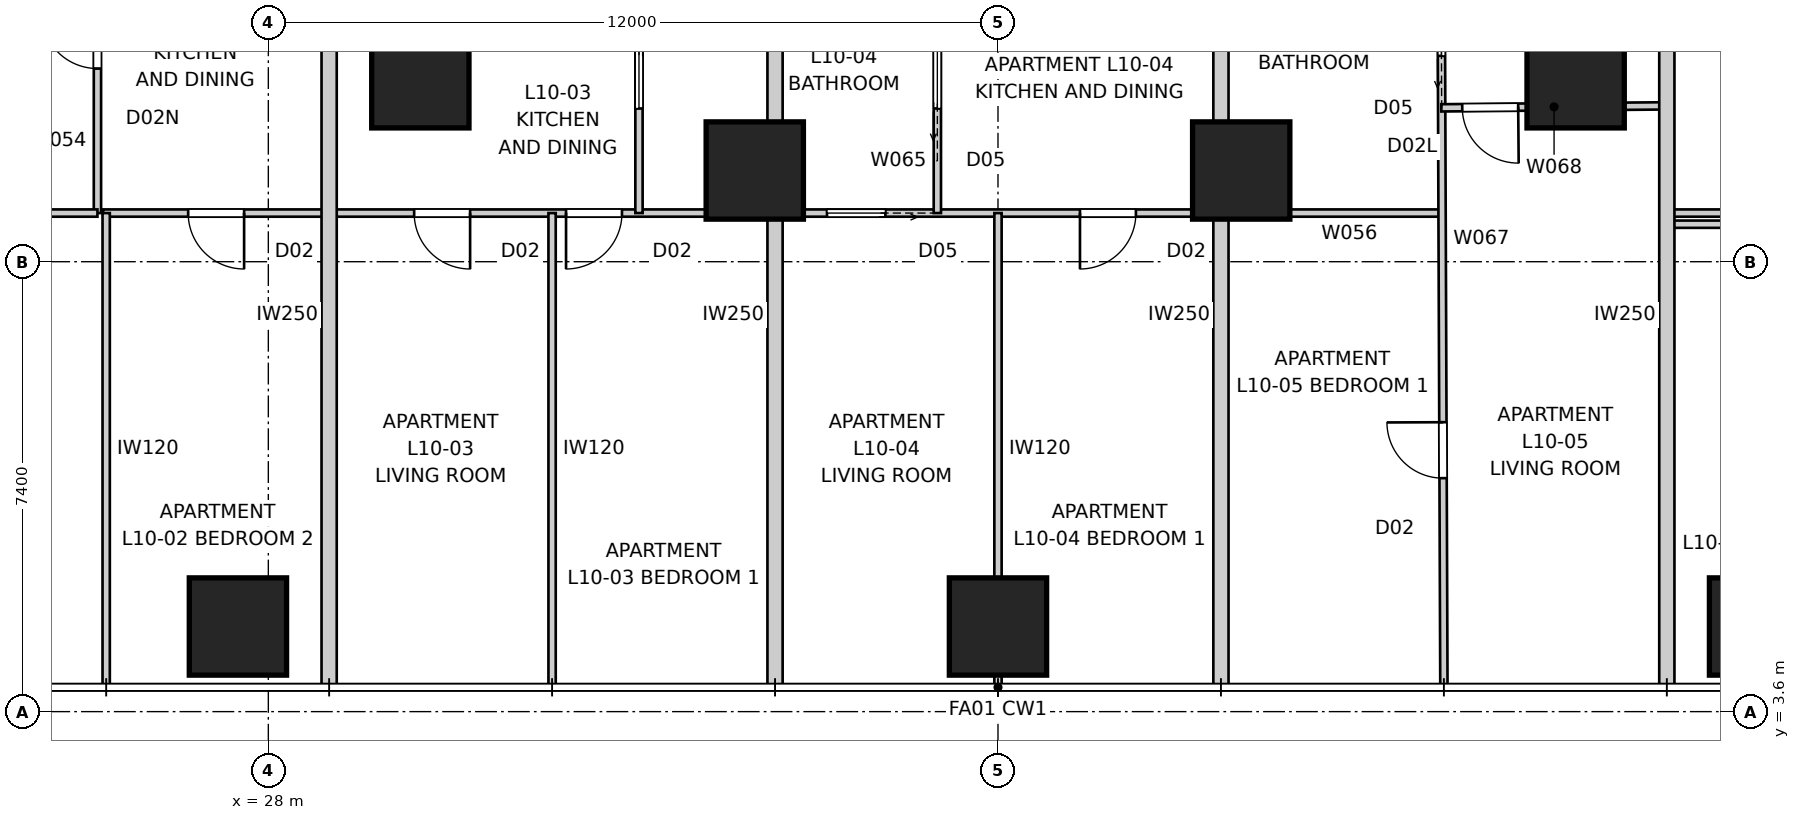
"""IFC4 building model, lengths in metres.
Left out: names, types, materials, properties, quantities, classifications, styles, units other than length and angle.
Written with IfcOpenShell. Run it as: python <this file> out.ifc"""

import sys

from ifc_helpers import new_model, si_unit, direction, frame, frame_2d, origin, origin_2d, place, context, subcontext, project, spatial, rectangle, extrude, element, fill, save


model = new_model("IFC4")
c1 = context("Model", 3, precision=1e-05, world=origin(), true_north=direction((0.0, 1.0)))
c2 = subcontext(c1, "Body", "Model", "MODEL_VIEW")
j1 = project(units=[si_unit("LENGTHUNIT", "METRE"), si_unit("PLANEANGLEUNIT", "RADIAN")], contexts=[c1])
p1 = place(None, origin())
s1 = spatial("IfcSite", under=j1, at=p1, CompositionType="ELEMENT")
p2 = place(p1, origin())
s2 = spatial("IfcBuilding", under=s1, at=p2, CompositionType="ELEMENT")
p3 = place(p2, frame((0.0, 0.0, 38.8)))
s3 = spatial("IfcBuildingStorey", under=s2, at=p3, CompositionType="ELEMENT", Elevation=38.8)
for number, where, z_axis, x_axis in (
    (1, (27.5, 5.0, 0.0), (0.0, 0.0, 1.0), (1.0, 0.0, 0.0)),
    (2, (40.0, 5.0, 0.0), (0.0, 0.0, 1.0), (1.0, 0.0, 0.0)),
    (3, (52.5, 5.0, 0.0), (0.0, 0.0, 1.0), (1.0, 0.0, 0.0)),
):
    element("IfcColumn", number, at=place(p3, frame(where, z_axis=z_axis, x_axis=x_axis)), inside=s3, PredefinedType="COLUMN", context=c2, shape_type="SweptSolid", body=[
        extrude(rectangle(XDim=1.6, YDim=1.6, at=origin_2d()), origin(), (0.0, 0.0, 1.0), 3.2),
    ])
for number, where, z_axis, x_axis in (
    (4, (30.5, 14.0, 0.0), (0.0, 0.0, 1.0), (1.0, 0.0, 0.0)),
    (5, (36.0, 12.5, 0.0), (0.0, 0.0, 1.0), (1.0, 0.0, 0.0)),
    (6, (44.0, 12.5, 0.0), (0.0, 0.0, 1.0), (1.0, 0.0, 0.0)),
    (7, (49.5, 14.0, 0.0), (0.0, 0.0, 1.0), (1.0, 0.0, 0.0)),
):
    element("IfcColumn", number, at=place(p3, frame(where, z_axis=z_axis, x_axis=x_axis)), inside=s3, PredefinedType="COLUMN", context=c2, shape_type="SweptSolid", body=[
        extrude(rectangle(XDim=1.6, YDim=1.6, at=origin_2d()), origin(), (0.0, 0.0, 1.0), 3.4),
    ])
for number, where, z_axis, x_axis in (
    (8, (29.0, 4.0, 0.0), (0.0, 0.0, 1.0), (0.0, 1.0, 0.0)),
    (9, (36.333, 4.0, 0.0), (0.0, 0.0, 1.0), (0.0, 1.0, 0.0)),
    (10, (43.667, 4.0, 0.0), (0.0, 0.0, 1.0), (0.0, 1.0, 0.0)),
    (11, (51.0, 4.0, 0.0), (0.0, 0.0, 1.0), (0.0, 1.0, 0.0)),
):
    element("IfcWall", number, at=place(p3, frame(where, z_axis=z_axis, x_axis=x_axis)), inside=s3, PredefinedType="PARTITIONING", context=c2, shape_type="SweptSolid", body=[
        extrude(rectangle(XDim=12.24, YDim=0.25, at=frame_2d((6.12, 0.0))), origin(), (0.0, 0.0, 1.0), 3.2),
    ])
p4 = place(p3, frame((25.189, 11.8, 0.0), z_axis=(0.0, 0.0, 1.0), x_axis=(0.0, 1.0, 0.0)))
e12 = element("IfcWall", 12, at=p4, inside=s3, PredefinedType="PARTITIONING", context=c2, shape_type="SweptSolid", body=[
    extrude(rectangle(XDim=5.674, YDim=0.12, at=frame_2d((2.837, 0.0))), origin(), (0.0, 0.0, 1.0), 3.2),
])
p5 = place(p4, frame((2.377, 0.0, 0.0)))
e13 = element("IfcOpeningElement", 13, at=p5, cuts=e12, PredefinedType="OPENING", context=c2, shape_type="SweptSolid", body=[
    extrude(rectangle(XDim=0.92, YDim=2.0, at=frame_2d((0.46, 1.0))), frame((0.0, 0.07, 0.0), z_axis=(0.0, -1.0, 0.0), x_axis=(1.0, 0.0, 0.0)), (0.0, 0.0, 1.0), 0.14),
])
p6 = place(p3, frame((47.287, 11.8, 0.0), z_axis=(0.0, 0.0, 1.0), x_axis=(-1.0, 0.0, 0.0)))
e14 = element("IfcWall", 14, at=p6, inside=s3, PredefinedType="PARTITIONING", context=c2, shape_type="SweptSolid", body=[
    extrude(rectangle(XDim=22.003, YDim=0.12, at=frame_2d((11.002, 0.0))), origin(), (0.0, 0.0, 1.0), 3.2),
])
p7 = place(p6, frame((15.968, 0.0, 0.0)))
e15 = element("IfcOpeningElement", 15, at=p7, cuts=e14, PredefinedType="OPENING", context=c2, shape_type="SweptSolid", body=[
    extrude(rectangle(XDim=0.92, YDim=2.34, at=frame_2d((0.46, 1.17))), frame((0.0, 0.07, 0.0), z_axis=(0.0, -1.0, 0.0), x_axis=(1.0, 0.0, 0.0)), (0.0, 0.0, 1.0), 0.14),
])
p8 = place(p6, frame((13.47, 0.0, 0.0)))
e16 = element("IfcOpeningElement", 16, at=p8, cuts=e14, PredefinedType="OPENING", context=c2, shape_type="SweptSolid", body=[
    extrude(rectangle(XDim=0.92, YDim=2.34, at=frame_2d((0.46, 1.17))), frame((0.0, 0.07, 0.0), z_axis=(0.0, -1.0, 0.0), x_axis=(1.0, 0.0, 0.0)), (0.0, 0.0, 1.0), 0.14),
])
p9 = place(p6, frame((5.018, 0.0, 0.0)))
e17 = element("IfcOpeningElement", 17, at=p9, cuts=e14, PredefinedType="OPENING", context=c2, shape_type="SweptSolid", body=[
    extrude(rectangle(XDim=0.92, YDim=2.34, at=frame_2d((0.46, 1.17))), frame((0.0, 0.07, 0.0), z_axis=(0.0, -1.0, 0.0), x_axis=(1.0, 0.0, 0.0)), (0.0, 0.0, 1.0), 0.14),
])
p10 = place(p6, frame((19.685, 0.0, 0.0)))
e18 = element("IfcOpeningElement", 18, at=p10, cuts=e14, PredefinedType="OPENING", context=c2, shape_type="SweptSolid", body=[
    extrude(rectangle(XDim=0.92, YDim=2.34, at=frame_2d((0.46, 1.17))), frame((0.0, 0.07, 0.0), z_axis=(0.0, -1.0, 0.0), x_axis=(1.0, 0.0, 0.0)), (0.0, 0.0, 1.0), 0.14),
])
p11 = place(p6, frame((9.138, 0.0, 0.0)))
e19 = element("IfcOpeningElement", 19, at=p11, cuts=e14, PredefinedType="OPENING", context=c2, shape_type="SweptSolid", body=[
    extrude(rectangle(XDim=0.96, YDim=2.1, at=frame_2d((0.48, 1.05))), frame((0.0, 0.07, 0.0), z_axis=(0.0, -1.0, 0.0), x_axis=(1.0, 0.0, 0.0)), (0.0, 0.0, 1.0), 0.14),
])
p12 = place(p3, frame((25.189, 11.8, 0.0), z_axis=(0.0, 0.0, 1.0), x_axis=(-1.0, 0.0, 0.0)))
e20 = element("IfcWall", 20, at=p12, inside=s3, PredefinedType="PARTITIONING", context=c2, shape_type="SweptSolid", body=[
    extrude(rectangle(XDim=3.389, YDim=0.12, at=frame_2d((1.695, 0.0))), origin(), (0.0, 0.0, 1.0), 3.2),
])
p13 = place(p3, frame((25.333, 11.8, 0.0), z_axis=(0.0, 0.0, 1.0), x_axis=(0.0, -1.0, 0.0)))
e21 = element("IfcWall", 21, at=p13, inside=s3, PredefinedType="PARTITIONING", context=c2, shape_type="SweptSolid", body=[
    extrude(rectangle(XDim=7.76, YDim=0.12, at=frame_2d((3.88, 0.0))), origin(), (0.0, 0.0, 1.0), 2.4),
])
p14 = place(p3, frame((34.096, 16.2, 0.0), z_axis=(0.0, 0.0, 1.0), x_axis=(0.0, -1.0, 0.0)))
e22 = element("IfcWall", 22, at=p14, inside=s3, PredefinedType="PARTITIONING", context=c2, shape_type="SweptSolid", body=[
    extrude(rectangle(XDim=4.4, YDim=0.12, at=frame_2d((2.2, 0.0))), origin(), (0.0, 0.0, 1.0), 2.671),
])
p15 = place(p14, frame((1.72, 0.0, 0.0)))
e23 = element("IfcOpeningElement", 23, at=p15, cuts=e22, PredefinedType="OPENING", context=c2, shape_type="SweptSolid", body=[
    extrude(rectangle(XDim=0.96, YDim=2.1, at=frame_2d((0.48, 1.05))), frame((0.0, 0.07, 0.0), z_axis=(0.0, -1.0, 0.0), x_axis=(1.0, 0.0, 0.0)), (0.0, 0.0, 1.0), 0.14),
])
p16 = place(p3, frame((32.667, 11.8, 0.0), z_axis=(0.0, 0.0, 1.0), x_axis=(0.0, -1.0, 0.0)))
e24 = element("IfcWall", 24, at=p16, inside=s3, PredefinedType="PARTITIONING", context=c2, shape_type="SweptSolid", body=[
    extrude(rectangle(XDim=7.76, YDim=0.12, at=frame_2d((3.88, 0.0))), origin(), (0.0, 0.0, 1.0), 3.2),
])
p17 = place(p3, frame((39.003, 11.8, 0.0), z_axis=(0.0, 0.0, 1.0), x_axis=(0.0, 1.0, 0.0)))
e25 = element("IfcWall", 25, at=p17, inside=s3, PredefinedType="PARTITIONING", context=c2, shape_type="SweptSolid", body=[
    extrude(rectangle(XDim=4.4, YDim=0.12, at=frame_2d((2.2, 0.0))), origin(), (0.0, 0.0, 1.0), 3.2),
])
p18 = place(p17, frame((1.72, 0.0, 0.0)))
e26 = element("IfcOpeningElement", 26, at=p18, cuts=e25, PredefinedType="OPENING", context=c2, shape_type="SweptSolid", body=[
    extrude(rectangle(XDim=0.96, YDim=2.1, at=frame_2d((0.48, 1.05))), frame((0.0, 0.07, 0.0), z_axis=(0.0, -1.0, 0.0), x_axis=(1.0, 0.0, 0.0)), (0.0, 0.0, 1.0), 0.14),
])
p19 = place(p3, frame((40.0, 11.8, 0.0), z_axis=(0.0, 0.0, 1.0), x_axis=(0.0, -1.0, 0.0)))
e27 = element("IfcWall", 27, at=p19, inside=s3, PredefinedType="PARTITIONING", context=c2, shape_type="SweptSolid", body=[
    extrude(rectangle(XDim=7.76, YDim=0.12, at=frame_2d((3.88, 0.0))), origin(), (0.0, 0.0, 1.0), 3.2),
])
p20 = place(p3, frame((47.333, 4.04, 0.0), z_axis=(0.0, 0.0, 1.0), x_axis=(-0.003834774141, 0.999992647227, 0.0)))
e28 = element("IfcWall", 28, at=p20, inside=s3, PredefinedType="PARTITIONING", context=c2, shape_type="SweptSolid", body=[
    extrude(rectangle(XDim=12.16, YDim=0.12, at=frame_2d((6.08, 0.0))), origin(), (0.0, 0.0, 1.0), 3.2),
])
p21 = place(p20, frame((10.345, 0.0, 0.0)))
e29 = element("IfcOpeningElement", 29, at=p21, cuts=e28, PredefinedType="OPENING", context=c2, shape_type="SweptSolid", body=[
    extrude(rectangle(XDim=0.96, YDim=2.1, at=frame_2d((0.48, 1.05))), frame((0.0, 0.07, 0.0), z_axis=(0.0, -1.0, 0.0), x_axis=(1.0, 0.0, 0.0)), (0.0, 0.0, 1.0), 0.14),
])
p22 = place(p20, frame((3.4, 0.0, 0.0)))
e30 = element("IfcOpeningElement", 30, at=p22, cuts=e28, PredefinedType="OPENING", context=c2, shape_type="SweptSolid", body=[
    extrude(rectangle(XDim=0.92, YDim=2.34, at=frame_2d((0.46, 1.17))), frame((0.0, 0.07, 0.0), z_axis=(0.0, -1.0, 0.0), x_axis=(1.0, 0.0, 0.0)), (0.0, 0.0, 1.0), 0.14),
])
p23 = place(p3, frame((51.0, 13.563, 0.0), z_axis=(0.0, 0.0, 1.0), x_axis=(-0.9999611125, -0.008818927805, 0.0)))
e31 = element("IfcWall", 31, at=p23, inside=s3, PredefinedType="PARTITIONING", context=c2, shape_type="SweptSolid", body=[
    extrude(rectangle(XDim=3.71, YDim=0.12, at=frame_2d((1.855, 0.0))), origin(), (0.0, 0.0, 1.0), 2.2),
])
p24 = place(p23, frame((2.445, 0.0, 0.0)))
e32 = element("IfcOpeningElement", 32, at=p24, cuts=e31, PredefinedType="OPENING", context=c2, shape_type="SweptSolid", body=[
    extrude(rectangle(XDim=0.92, YDim=2.1, at=frame_2d((0.46, 1.05))), frame((0.0, 0.07, 0.0), z_axis=(0.0, -1.0, 0.0), x_axis=(1.0, 0.0, 0.0)), (0.0, 0.0, 1.0), 0.14),
])
p25 = place(p3, frame((58.2, 11.8, 0.0), z_axis=(0.0, 0.0, 1.0), x_axis=(-1.0, 0.0, 0.0)))
e33 = element("IfcWall", 33, at=p25, inside=s3, PredefinedType="PARTITIONING", context=c2, shape_type="SweptSolid", body=[
    extrude(rectangle(XDim=7.2, YDim=0.12, at=frame_2d((3.6, 0.0))), origin(), (0.0, 0.0, 1.0), 3.2),
])
p26 = place(p3, frame((58.333, 11.617, 0.0), z_axis=(0.0, 0.0, 1.0), x_axis=(-1.0, 0.0, 0.0)))
e34 = element("IfcWall", 34, at=p26, inside=s3, PredefinedType="PARTITIONING", context=c2, shape_type="SweptSolid", body=[
    extrude(rectangle(XDim=7.333, YDim=0.12, at=frame_2d((3.667, 0.0))), origin(), (0.0, 0.0, 1.0), 3.2),
])
p27 = place(p15, origin())
e35 = element("IfcDoor", 35, at=p27, inside=s3, OperationType="SLIDING_TO_LEFT", PredefinedType="DOOR", context=c2, shape_type="SweptSolid", body=[
    extrude(rectangle(XDim=0.96, YDim=2.1, at=frame_2d((0.48, 1.05))), frame((0.0, 0.025, 0.0), z_axis=(0.0, -1.0, 0.0), x_axis=(1.0, 0.0, 0.0)), (0.0, 0.0, 1.0), 0.05),
])
fill(e23, e35)
p28 = place(p7, origin())
e36 = element("IfcDoor", 36, at=p28, inside=s3, OperationType="SINGLE_SWING_LEFT", PredefinedType="DOOR", context=c2, shape_type="SweptSolid", body=[
    extrude(rectangle(XDim=0.92, YDim=2.34, at=frame_2d((0.46, 1.17))), frame((0.0, 0.025, 0.0), z_axis=(0.0, -1.0, 0.0), x_axis=(1.0, 0.0, 0.0)), (0.0, 0.0, 1.0), 0.05),
])
fill(e15, e36)
p29 = place(p8, origin())
e37 = element("IfcDoor", 37, at=p29, inside=s3, OperationType="SINGLE_SWING_RIGHT", PredefinedType="DOOR", context=c2, shape_type="SweptSolid", body=[
    extrude(rectangle(XDim=0.92, YDim=2.34, at=frame_2d((0.46, 1.17))), frame((0.0, 0.025, 0.0), z_axis=(0.0, -1.0, 0.0), x_axis=(1.0, 0.0, 0.0)), (0.0, 0.0, 1.0), 0.05),
])
fill(e16, e37)
p30 = place(p18, origin())
e38 = element("IfcDoor", 38, at=p30, inside=s3, OperationType="SLIDING_TO_LEFT", PredefinedType="DOOR", context=c2, shape_type="SweptSolid", body=[
    extrude(rectangle(XDim=0.96, YDim=2.1, at=frame_2d((0.48, 1.05))), frame((0.0, 0.025, 0.0), z_axis=(0.0, -1.0, 0.0), x_axis=(1.0, 0.0, 0.0)), (0.0, 0.0, 1.0), 0.05),
])
fill(e26, e38)
p31 = place(p9, origin())
e39 = element("IfcDoor", 39, at=p31, inside=s3, OperationType="SINGLE_SWING_RIGHT", PredefinedType="DOOR", context=c2, shape_type="SweptSolid", body=[
    extrude(rectangle(XDim=0.92, YDim=2.34, at=frame_2d((0.46, 1.17))), frame((0.0, 0.025, 0.0), z_axis=(0.0, -1.0, 0.0), x_axis=(1.0, 0.0, 0.0)), (0.0, 0.0, 1.0), 0.05),
])
fill(e17, e39)
p32 = place(p24, origin())
e40 = element("IfcDoor", 40, at=p32, inside=s3, OperationType="SINGLE_SWING_LEFT", PredefinedType="DOOR", context=c2, shape_type="SweptSolid", body=[
    extrude(rectangle(XDim=0.92, YDim=2.1, at=frame_2d((0.46, 1.05))), frame((0.0, 0.025, 0.0), z_axis=(0.0, -1.0, 0.0), x_axis=(1.0, 0.0, 0.0)), (0.0, 0.0, 1.0), 0.05),
])
fill(e32, e40)
p33 = place(p21, origin())
e41 = element("IfcDoor", 41, at=p33, inside=s3, OperationType="SLIDING_TO_LEFT", PredefinedType="DOOR", context=c2, shape_type="SweptSolid", body=[
    extrude(rectangle(XDim=0.96, YDim=2.1, at=frame_2d((0.48, 1.05))), frame((0.0, 0.025, 0.0), z_axis=(0.0, -1.0, 0.0), x_axis=(1.0, 0.0, 0.0)), (0.0, 0.0, 1.0), 0.05),
])
fill(e29, e41)
p34 = place(p5, origin())
e42 = element("IfcDoor", 42, at=p34, inside=s3, OperationType="SINGLE_SWING_RIGHT", PredefinedType="DOOR", context=c2, shape_type="SweptSolid", body=[
    extrude(rectangle(XDim=0.92, YDim=2.0, at=frame_2d((0.46, 1.0))), frame((0.0, 0.025, 0.0), z_axis=(0.0, -1.0, 0.0), x_axis=(1.0, 0.0, 0.0)), (0.0, 0.0, 1.0), 0.05),
])
fill(e13, e42)
p35 = place(p10, origin())
e43 = element("IfcDoor", 43, at=p35, inside=s3, OperationType="SINGLE_SWING_LEFT", PredefinedType="DOOR", context=c2, shape_type="SweptSolid", body=[
    extrude(rectangle(XDim=0.92, YDim=2.34, at=frame_2d((0.46, 1.17))), frame((0.0, 0.025, 0.0), z_axis=(0.0, -1.0, 0.0), x_axis=(1.0, 0.0, 0.0)), (0.0, 0.0, 1.0), 0.05),
])
fill(e18, e43)
p36 = place(p11, origin())
e44 = element("IfcDoor", 44, at=p36, inside=s3, OperationType="SLIDING_TO_LEFT", PredefinedType="DOOR", context=c2, shape_type="SweptSolid", body=[
    extrude(rectangle(XDim=0.96, YDim=2.1, at=frame_2d((0.48, 1.05))), frame((0.0, 0.025, 0.0), z_axis=(0.0, -1.0, 0.0), x_axis=(1.0, 0.0, 0.0)), (0.0, 0.0, 1.0), 0.05),
])
fill(e19, e44)
p37 = place(p22, origin())
e45 = element("IfcDoor", 45, at=p37, inside=s3, OperationType="SINGLE_SWING_RIGHT", PredefinedType="DOOR", context=c2, shape_type="SweptSolid", body=[
    extrude(rectangle(XDim=0.92, YDim=2.34, at=frame_2d((0.46, 1.17))), frame((0.0, 0.025, 0.0), z_axis=(0.0, -1.0, 0.0), x_axis=(1.0, 0.0, 0.0)), (0.0, 0.0, 1.0), 0.05),
])
fill(e30, e45)
save(model, sys.argv[1])
